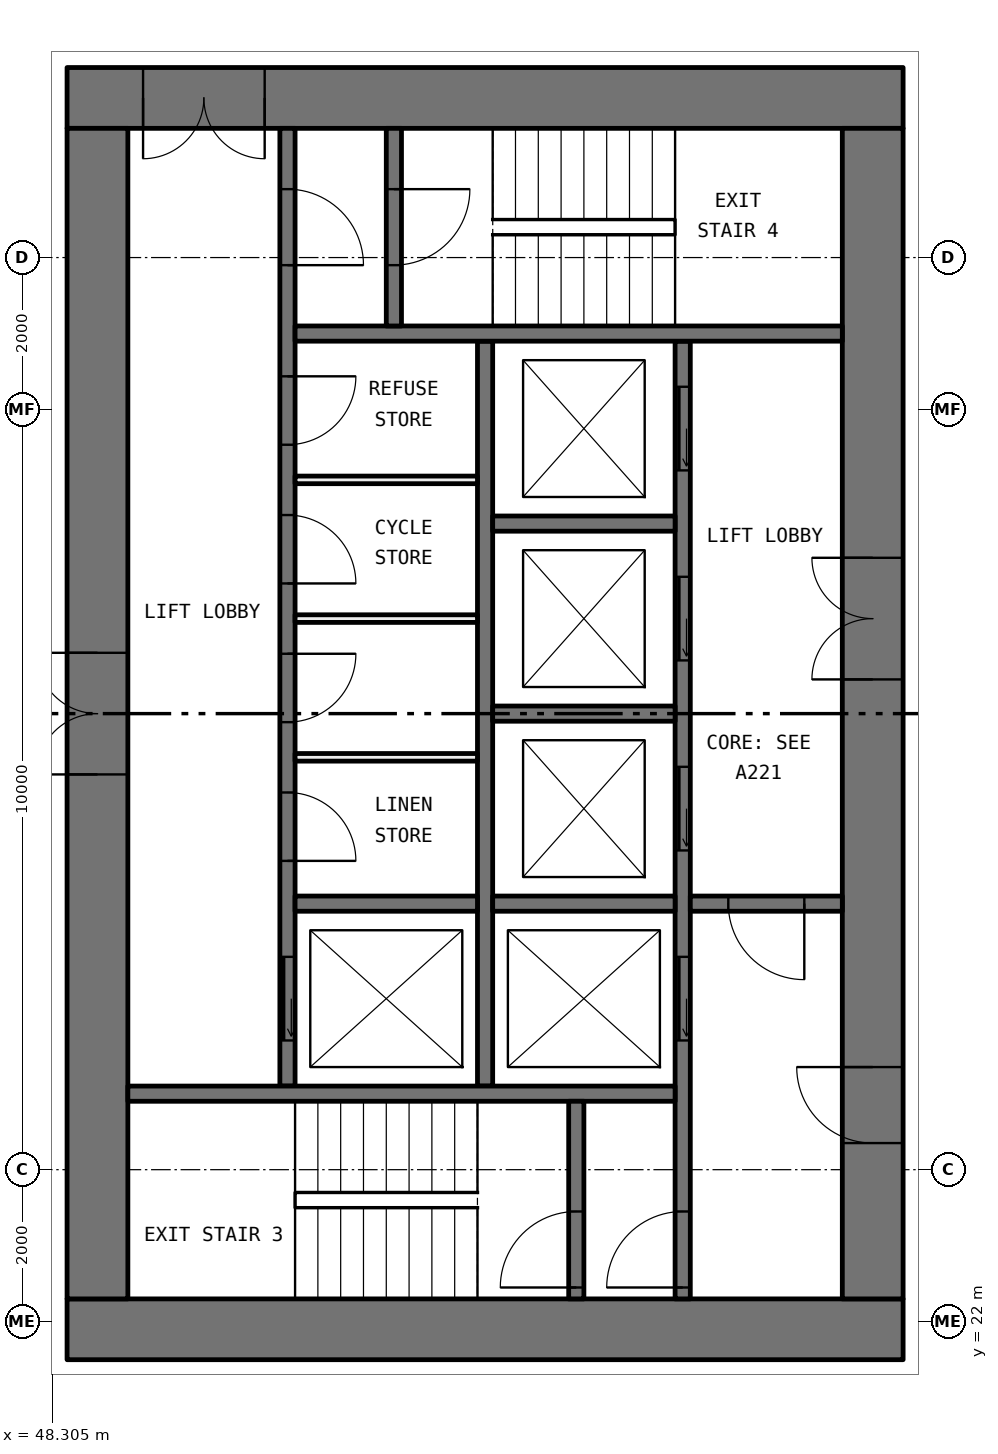
"""IFC4 building model, lengths in metres.
Left out: names, types, materials, properties, quantities, classifications, styles, units other than length and angle.
Written with IfcOpenShell. Run it as: python <this file> out.ifc"""

import sys

from ifc_helpers import new_model, si_unit, direction, frame, frame_2d, origin, place, context, subcontext, project, spatial, rectangle, extrude, element, fill, save


model = new_model("IFC4")
c1 = context("Model", 3, precision=1e-05, world=origin(), true_north=direction((0.0, 1.0)))
c2 = subcontext(c1, "Body", "Model", "MODEL_VIEW")
j1 = project(units=[si_unit("LENGTHUNIT", "METRE"), si_unit("PLANEANGLEUNIT", "RADIAN")], contexts=[c1])
p1 = place(None, origin())
s1 = spatial("IfcSite", under=j1, at=p1, CompositionType="ELEMENT")
p2 = place(p1, origin())
s2 = spatial("IfcBuilding", under=s1, at=p2, CompositionType="ELEMENT")
p3 = place(p2, frame((0.0, 0.0, 81.75)))
s3 = spatial("IfcBuildingStorey", under=s2, at=p3, CompositionType="ELEMENT", Elevation=81.75)
p4 = place(p3, frame((59.5, 21.9, 0.0), z_axis=(0.0, 0.0, 1.0), x_axis=(-1.0, 0.0, 0.0)))
e1 = element("IfcWall", 1, at=p4, inside=s3, PredefinedType="SHEAR", context=c2, shape_type="SweptSolid", body=[
    extrude(rectangle(XDim=11.0, YDim=0.8, at=frame_2d((5.5, 0.0))), origin(), (0.0, 0.0, 1.0), 3.05),
])
p5 = place(p3, frame((59.5, 38.1, 0.0), z_axis=(0.0, 0.0, 1.0), x_axis=(-1.0, 0.0, 0.0)))
e2 = element("IfcWall", 2, at=p5, inside=s3, PredefinedType="SHEAR", context=c2, shape_type="SweptSolid", body=[
    extrude(rectangle(XDim=11.0, YDim=0.8, at=frame_2d((5.5, 0.0))), origin(), (0.0, 0.0, 1.0), 3.05),
])
p6 = place(p5, frame((8.4, 0.0, 0.0)))
e3 = element("IfcOpeningElement", 3, at=p6, cuts=e2, PredefinedType="OPENING", context=c2, shape_type="SweptSolid", body=[
    extrude(rectangle(XDim=1.6, YDim=2.1, at=frame_2d((0.8, 1.05))), frame((0.0, 0.41, 0.0), z_axis=(0.0, -1.0, 0.0), x_axis=(1.0, 0.0, 0.0)), (0.0, 0.0, 1.0), 0.82),
])
p7 = place(p3, frame((59.1, 22.3, 0.0), z_axis=(0.0, 0.0, 1.0), x_axis=(0.0, 1.0, 0.0)))
e4 = element("IfcWall", 4, at=p7, inside=s3, PredefinedType="SHEAR", context=c2, shape_type="SweptSolid", body=[
    extrude(rectangle(XDim=15.4, YDim=0.8, at=frame_2d((7.7, 0.0))), origin(), (0.0, 0.0, 1.0), 3.05),
])
p8 = place(p7, frame((8.15, 0.0, 0.0)))
e5 = element("IfcOpeningElement", 5, at=p8, cuts=e4, PredefinedType="OPENING", context=c2, shape_type="SweptSolid", body=[
    extrude(rectangle(XDim=1.6, YDim=2.1, at=frame_2d((0.8, 1.05))), frame((0.0, 0.41, 0.0), z_axis=(0.0, -1.0, 0.0), x_axis=(1.0, 0.0, 0.0)), (0.0, 0.0, 1.0), 0.82),
])
p9 = place(p7, frame((2.05, 0.0, 0.0)))
e6 = element("IfcOpeningElement", 6, at=p9, cuts=e4, PredefinedType="OPENING", context=c2, shape_type="SweptSolid", body=[
    extrude(rectangle(XDim=1.0, YDim=2.1, at=frame_2d((0.5, 1.05))), frame((0.0, 0.41, 0.0), z_axis=(0.0, -1.0, 0.0), x_axis=(1.0, 0.0, 0.0)), (0.0, 0.0, 1.0), 0.82),
])
p10 = place(p3, frame((48.9, 22.3, 0.0), z_axis=(0.0, 0.0, 1.0), x_axis=(0.0, 1.0, 0.0)))
e7 = element("IfcWall", 7, at=p10, inside=s3, PredefinedType="SHEAR", context=c2, shape_type="SweptSolid", body=[
    extrude(rectangle(XDim=15.4, YDim=0.8, at=frame_2d((7.7, 0.0))), origin(), (0.0, 0.0, 1.0), 3.05),
])
p11 = place(p10, frame((6.9, 0.0, 0.0)))
e8 = element("IfcOpeningElement", 8, at=p11, cuts=e7, PredefinedType="OPENING", context=c2, shape_type="SweptSolid", body=[
    extrude(rectangle(XDim=1.6, YDim=2.1, at=frame_2d((0.8, 1.05))), frame((0.0, 0.41, 0.0), z_axis=(0.0, -1.0, 0.0), x_axis=(1.0, 0.0, 0.0)), (0.0, 0.0, 1.0), 0.82),
])
p12 = place(p3, frame((56.6, 22.3, 0.0), z_axis=(0.0, 0.0, 1.0), x_axis=(0.0, 1.0, 0.0)))
e9 = element("IfcWall", 9, at=p12, inside=s3, PredefinedType="SOLIDWALL", context=c2, shape_type="SweptSolid", body=[
    extrude(rectangle(XDim=12.6, YDim=0.2, at=frame_2d((6.3, 0.0))), origin(), (0.0, 0.0, 1.0), 3.05),
])
p13 = place(p12, frame((3.4, 0.0, 0.0)))
e10 = element("IfcOpeningElement", 10, at=p13, cuts=e9, PredefinedType="OPENING", context=c2, shape_type="SweptSolid", body=[
    extrude(rectangle(XDim=1.1, YDim=2.1, at=frame_2d((0.55, 1.05))), frame((0.0, 0.11, 0.0), z_axis=(0.0, -1.0, 0.0), x_axis=(1.0, 0.0, 0.0)), (0.0, 0.0, 1.0), 0.22),
])
p14 = place(p12, frame((5.9, 0.0, 0.0)))
e11 = element("IfcOpeningElement", 11, at=p14, cuts=e9, PredefinedType="OPENING", context=c2, shape_type="SweptSolid", body=[
    extrude(rectangle(XDim=1.1, YDim=2.1, at=frame_2d((0.55, 1.05))), frame((0.0, 0.11, 0.0), z_axis=(0.0, -1.0, 0.0), x_axis=(1.0, 0.0, 0.0)), (0.0, 0.0, 1.0), 0.22),
])
p15 = place(p12, frame((8.4, 0.0, 0.0)))
e12 = element("IfcOpeningElement", 12, at=p15, cuts=e9, PredefinedType="OPENING", context=c2, shape_type="SweptSolid", body=[
    extrude(rectangle(XDim=1.1, YDim=2.1, at=frame_2d((0.55, 1.05))), frame((0.0, 0.11, 0.0), z_axis=(0.0, -1.0, 0.0), x_axis=(1.0, 0.0, 0.0)), (0.0, 0.0, 1.0), 0.22),
])
p16 = place(p12, frame((10.9, 0.0, 0.0)))
e13 = element("IfcOpeningElement", 13, at=p16, cuts=e9, PredefinedType="OPENING", context=c2, shape_type="SweptSolid", body=[
    extrude(rectangle(XDim=1.1, YDim=2.1, at=frame_2d((0.55, 1.05))), frame((0.0, 0.11, 0.0), z_axis=(0.0, -1.0, 0.0), x_axis=(1.0, 0.0, 0.0)), (0.0, 0.0, 1.0), 0.22),
])
p17 = place(p12, frame((0.15, 0.0, 0.0)))
e14 = element("IfcOpeningElement", 14, at=p17, cuts=e9, PredefinedType="OPENING", context=c2, shape_type="SweptSolid", body=[
    extrude(rectangle(XDim=1.0, YDim=2.1, at=frame_2d((0.5, 1.05))), frame((0.0, 0.11, 0.0), z_axis=(0.0, -1.0, 0.0), x_axis=(1.0, 0.0, 0.0)), (0.0, 0.0, 1.0), 0.22),
])
p18 = place(p3, frame((51.4, 25.1, 0.0), z_axis=(0.0, 0.0, 1.0), x_axis=(0.0, 1.0, 0.0)))
e15 = element("IfcWall", 15, at=p18, inside=s3, PredefinedType="SOLIDWALL", context=c2, shape_type="SweptSolid", body=[
    extrude(rectangle(XDim=12.6, YDim=0.2, at=frame_2d((6.3, 0.0))), origin(), (0.0, 0.0, 1.0), 3.05),
])
p19 = place(p18, frame((0.6, 0.0, 0.0)))
e16 = element("IfcOpeningElement", 16, at=p19, cuts=e15, PredefinedType="OPENING", context=c2, shape_type="SweptSolid", body=[
    extrude(rectangle(XDim=1.1, YDim=2.1, at=frame_2d((0.55, 1.05))), frame((0.0, 0.11, 0.0), z_axis=(0.0, -1.0, 0.0), x_axis=(1.0, 0.0, 0.0)), (0.0, 0.0, 1.0), 0.22),
])
p20 = place(p18, frame((10.8, 0.0, 0.0)))
e17 = element("IfcOpeningElement", 17, at=p20, cuts=e15, PredefinedType="OPENING", context=c2, shape_type="SweptSolid", body=[
    extrude(rectangle(XDim=1.0, YDim=2.1, at=frame_2d((0.5, 1.05))), frame((0.0, 0.11, 0.0), z_axis=(0.0, -1.0, 0.0), x_axis=(1.0, 0.0, 0.0)), (0.0, 0.0, 1.0), 0.22),
])
p21 = place(p18, frame((2.962, 0.0, 0.0)))
e18 = element("IfcOpeningElement", 18, at=p21, cuts=e15, PredefinedType="OPENING", context=c2, shape_type="SweptSolid", body=[
    extrude(rectangle(XDim=0.9, YDim=2.1, at=frame_2d((0.45, 1.05))), frame((0.0, 0.11, 0.0), z_axis=(0.0, -1.0, 0.0), x_axis=(1.0, 0.0, 0.0)), (0.0, 0.0, 1.0), 0.22),
])
p22 = place(p18, frame((4.788, 0.0, 0.0)))
e19 = element("IfcOpeningElement", 19, at=p22, cuts=e15, PredefinedType="OPENING", context=c2, shape_type="SweptSolid", body=[
    extrude(rectangle(XDim=0.9, YDim=2.1, at=frame_2d((0.45, 1.05))), frame((0.0, 0.11, 0.0), z_axis=(0.0, -1.0, 0.0), x_axis=(1.0, 0.0, 0.0)), (0.0, 0.0, 1.0), 0.22),
])
p23 = place(p18, frame((6.613, 0.0, 0.0)))
e20 = element("IfcOpeningElement", 20, at=p23, cuts=e15, PredefinedType="OPENING", context=c2, shape_type="SweptSolid", body=[
    extrude(rectangle(XDim=0.9, YDim=2.1, at=frame_2d((0.45, 1.05))), frame((0.0, 0.11, 0.0), z_axis=(0.0, -1.0, 0.0), x_axis=(1.0, 0.0, 0.0)), (0.0, 0.0, 1.0), 0.22),
])
p24 = place(p18, frame((8.438, 0.0, 0.0)))
e21 = element("IfcOpeningElement", 21, at=p24, cuts=e15, PredefinedType="OPENING", context=c2, shape_type="SweptSolid", body=[
    extrude(rectangle(XDim=0.9, YDim=2.1, at=frame_2d((0.45, 1.05))), frame((0.0, 0.11, 0.0), z_axis=(0.0, -1.0, 0.0), x_axis=(1.0, 0.0, 0.0)), (0.0, 0.0, 1.0), 0.22),
])
p25 = place(p3, frame((54.0, 25.1, 0.0), z_axis=(0.0, 0.0, 1.0), x_axis=(0.0, 1.0, 0.0)))
e22 = element("IfcWall", 22, at=p25, inside=s3, PredefinedType="SOLIDWALL", context=c2, shape_type="SweptSolid", body=[
    extrude(rectangle(XDim=9.8, YDim=0.2, at=frame_2d((4.9, 0.0))), origin(), (0.0, 0.0, 1.0), 3.05),
])
for number, where, z_axis, x_axis in (
    (23, (56.5, 25.0, 0.0), (0.0, 0.0, 1.0), (-1.0, 0.0, 0.0)),
    (24, (58.7, 35.0, 0.0), (0.0, 0.0, 1.0), (-1.0, 0.0, 0.0)),
):
    element("IfcWall", number, at=place(p3, frame(where, z_axis=z_axis, x_axis=x_axis)), inside=s3, PredefinedType="SOLIDWALL", context=c2, shape_type="SweptSolid", body=[
        extrude(rectangle(XDim=7.2, YDim=0.2, at=frame_2d((3.6, 0.0))), origin(), (0.0, 0.0, 1.0), 3.05),
    ])
p26 = place(p3, frame((58.7, 27.5, 0.0), z_axis=(0.0, 0.0, 1.0), x_axis=(-1.0, 0.0, 0.0)))
e25 = element("IfcWall", 25, at=p26, inside=s3, PredefinedType="SOLIDWALL", context=c2, shape_type="SweptSolid", body=[
    extrude(rectangle(XDim=2.0, YDim=0.2, at=frame_2d((1.0, 0.0))), origin(), (0.0, 0.0, 1.0), 3.05),
])
p27 = place(p26, frame((0.5, 0.0, 0.0)))
e26 = element("IfcOpeningElement", 26, at=p27, cuts=e25, PredefinedType="OPENING", context=c2, shape_type="SweptSolid", body=[
    extrude(rectangle(XDim=1.0, YDim=2.1, at=frame_2d((0.5, 1.05))), frame((0.0, 0.11, 0.0), z_axis=(0.0, -1.0, 0.0), x_axis=(1.0, 0.0, 0.0)), (0.0, 0.0, 1.0), 0.22),
])
p28 = place(p3, frame((55.2, 22.3, 0.0), z_axis=(0.0, 0.0, 1.0), x_axis=(0.0, 1.0, 0.0)))
e27 = element("IfcWall", 27, at=p28, inside=s3, PredefinedType="SOLIDWALL", context=c2, shape_type="SweptSolid", body=[
    extrude(rectangle(XDim=2.6, YDim=0.2, at=frame_2d((1.3, 0.0))), origin(), (0.0, 0.0, 1.0), 3.05),
])
p29 = place(p28, frame((0.15, 0.0, 0.0)))
e28 = element("IfcOpeningElement", 28, at=p29, cuts=e27, PredefinedType="OPENING", context=c2, shape_type="SweptSolid", body=[
    extrude(rectangle(XDim=1.0, YDim=2.1, at=frame_2d((0.5, 1.05))), frame((0.0, 0.11, 0.0), z_axis=(0.0, -1.0, 0.0), x_axis=(1.0, 0.0, 0.0)), (0.0, 0.0, 1.0), 0.22),
])
p30 = place(p3, frame((52.8, 35.1, 0.0), z_axis=(0.0, 0.0, 1.0), x_axis=(0.0, 1.0, 0.0)))
e29 = element("IfcWall", 29, at=p30, inside=s3, PredefinedType="SOLIDWALL", context=c2, shape_type="SweptSolid", body=[
    extrude(rectangle(XDim=2.6, YDim=0.2, at=frame_2d((1.3, 0.0))), origin(), (0.0, 0.0, 1.0), 3.05),
])
p31 = place(p30, frame((0.8, 0.0, 0.0)))
e30 = element("IfcOpeningElement", 30, at=p31, cuts=e29, PredefinedType="OPENING", context=c2, shape_type="SweptSolid", body=[
    extrude(rectangle(XDim=1.0, YDim=2.1, at=frame_2d((0.5, 1.05))), frame((0.0, 0.11, 0.0), z_axis=(0.0, -1.0, 0.0), x_axis=(1.0, 0.0, 0.0)), (0.0, 0.0, 1.0), 0.22),
])
for number, where, z_axis, x_axis in (
    (31, (56.5, 27.5, 0.0), (0.0, 0.0, 1.0), (-1.0, 0.0, 0.0)),
    (32, (56.5, 30.0, 0.0), (0.0, 0.0, 1.0), (-1.0, 0.0, 0.0)),
    (33, (56.5, 32.5, 0.0), (0.0, 0.0, 1.0), (-1.0, 0.0, 0.0)),
    (34, (53.9, 27.5, 0.0), (0.0, 0.0, 1.0), (-1.0, 0.0, 0.0)),
):
    element("IfcWall", number, at=place(p3, frame(where, z_axis=z_axis, x_axis=x_axis)), inside=s3, PredefinedType="SOLIDWALL", context=c2, shape_type="SweptSolid", body=[
        extrude(rectangle(XDim=2.4, YDim=0.2, at=frame_2d((1.2, 0.0))), origin(), (0.0, 0.0, 1.0), 3.05),
    ])
for number, where, z_axis, x_axis in (
    (35, (53.9, 29.425, 0.0), (0.0, 0.0, 1.0), (-1.0, 0.0, 0.0)),
    (36, (53.9, 31.25, 0.0), (0.0, 0.0, 1.0), (-1.0, 0.0, 0.0)),
    (37, (53.9, 33.075, 0.0), (0.0, 0.0, 1.0), (-1.0, 0.0, 0.0)),
):
    element("IfcWall", number, at=place(p3, frame(where, z_axis=z_axis, x_axis=x_axis)), inside=s3, PredefinedType="PARTITIONING", context=c2, shape_type="SweptSolid", body=[
        extrude(rectangle(XDim=2.4, YDim=0.1, at=frame_2d((1.2, 0.0))), origin(), (0.0, 0.0, 1.0), 3.05),
    ])
p32 = place(p19, origin())
e38 = element("IfcDoor", 38, at=p32, inside=s3, OperationType="SLIDING_TO_LEFT", PredefinedType="DOOR", context=c2, shape_type="SweptSolid", body=[
    extrude(rectangle(XDim=1.1, YDim=2.1, at=frame_2d((0.55, 1.05))), frame((0.0, 0.025, 0.0), z_axis=(0.0, -1.0, 0.0), x_axis=(1.0, 0.0, 0.0)), (0.0, 0.0, 1.0), 0.05),
])
fill(e16, e38)
p33 = place(p13, origin())
e39 = element("IfcDoor", 39, at=p33, inside=s3, OperationType="SLIDING_TO_LEFT", PredefinedType="DOOR", context=c2, shape_type="SweptSolid", body=[
    extrude(rectangle(XDim=1.1, YDim=2.1, at=frame_2d((0.55, 1.05))), frame((0.0, 0.025, 0.0), z_axis=(0.0, -1.0, 0.0), x_axis=(1.0, 0.0, 0.0)), (0.0, 0.0, 1.0), 0.05),
])
fill(e10, e39)
p34 = place(p14, origin())
e40 = element("IfcDoor", 40, at=p34, inside=s3, OperationType="SLIDING_TO_LEFT", PredefinedType="DOOR", context=c2, shape_type="SweptSolid", body=[
    extrude(rectangle(XDim=1.1, YDim=2.1, at=frame_2d((0.55, 1.05))), frame((0.0, 0.025, 0.0), z_axis=(0.0, -1.0, 0.0), x_axis=(1.0, 0.0, 0.0)), (0.0, 0.0, 1.0), 0.05),
])
fill(e11, e40)
p35 = place(p15, origin())
e41 = element("IfcDoor", 41, at=p35, inside=s3, OperationType="SLIDING_TO_LEFT", PredefinedType="DOOR", context=c2, shape_type="SweptSolid", body=[
    extrude(rectangle(XDim=1.1, YDim=2.1, at=frame_2d((0.55, 1.05))), frame((0.0, 0.025, 0.0), z_axis=(0.0, -1.0, 0.0), x_axis=(1.0, 0.0, 0.0)), (0.0, 0.0, 1.0), 0.05),
])
fill(e12, e41)
p36 = place(p16, origin())
e42 = element("IfcDoor", 42, at=p36, inside=s3, OperationType="SLIDING_TO_LEFT", PredefinedType="DOOR", context=c2, shape_type="SweptSolid", body=[
    extrude(rectangle(XDim=1.1, YDim=2.1, at=frame_2d((0.55, 1.05))), frame((0.0, 0.025, 0.0), z_axis=(0.0, -1.0, 0.0), x_axis=(1.0, 0.0, 0.0)), (0.0, 0.0, 1.0), 0.05),
])
fill(e13, e42)
p37 = place(p29, origin())
e43 = element("IfcDoor", 43, at=p37, inside=s3, OperationType="SINGLE_SWING_RIGHT", PredefinedType="DOOR", context=c2, shape_type="SweptSolid", body=[
    extrude(rectangle(XDim=1.0, YDim=2.1, at=frame_2d((0.5, 1.05))), frame((0.0, 0.025, 0.0), z_axis=(0.0, -1.0, 0.0), x_axis=(1.0, 0.0, 0.0)), (0.0, 0.0, 1.0), 0.05),
])
fill(e28, e43)
p38 = place(p17, origin())
e44 = element("IfcDoor", 44, at=p38, inside=s3, OperationType="SINGLE_SWING_RIGHT", PredefinedType="DOOR", context=c2, shape_type="SweptSolid", body=[
    extrude(rectangle(XDim=1.0, YDim=2.1, at=frame_2d((0.5, 1.05))), frame((0.0, 0.025, 0.0), z_axis=(0.0, -1.0, 0.0), x_axis=(1.0, 0.0, 0.0)), (0.0, 0.0, 1.0), 0.05),
])
fill(e14, e44)
p39 = place(p20, frame((1.0, 0.0, 0.0), x_axis=(-1.0, 0.0, 0.0)))
e45 = element("IfcDoor", 45, at=p39, inside=s3, OperationType="SINGLE_SWING_LEFT", PredefinedType="DOOR", context=c2, shape_type="SweptSolid", body=[
    extrude(rectangle(XDim=1.0, YDim=2.1, at=frame_2d((0.5, 1.05))), frame((0.0, 0.025, 0.0), z_axis=(0.0, -1.0, 0.0), x_axis=(1.0, 0.0, 0.0)), (0.0, 0.0, 1.0), 0.05),
])
fill(e17, e45)
p40 = place(p31, frame((1.0, 0.0, 0.0), x_axis=(-1.0, 0.0, 0.0)))
e46 = element("IfcDoor", 46, at=p40, inside=s3, OperationType="SINGLE_SWING_RIGHT", PredefinedType="DOOR", context=c2, shape_type="SweptSolid", body=[
    extrude(rectangle(XDim=1.0, YDim=2.1, at=frame_2d((0.5, 1.05))), frame((0.0, 0.025, 0.0), z_axis=(0.0, -1.0, 0.0), x_axis=(1.0, 0.0, 0.0)), (0.0, 0.0, 1.0), 0.05),
])
fill(e30, e46)
p41 = place(p27, origin())
e47 = element("IfcDoor", 47, at=p41, inside=s3, OperationType="SINGLE_SWING_RIGHT", PredefinedType="DOOR", context=c2, shape_type="SweptSolid", body=[
    extrude(rectangle(XDim=1.0, YDim=2.1, at=frame_2d((0.5, 1.05))), frame((0.0, 0.025, 0.0), z_axis=(0.0, -1.0, 0.0), x_axis=(1.0, 0.0, 0.0)), (0.0, 0.0, 1.0), 0.05),
])
fill(e26, e47)
p42 = place(p8, origin())
e48 = element("IfcDoor", 48, at=p42, inside=s3, OperationType="DOUBLE_DOOR_SINGLE_SWING", PredefinedType="DOOR", context=c2, shape_type="SweptSolid", body=[
    extrude(rectangle(XDim=1.6, YDim=2.1, at=frame_2d((0.8, 1.05))), frame((0.0, 0.025, 0.0), z_axis=(0.0, -1.0, 0.0), x_axis=(1.0, 0.0, 0.0)), (0.0, 0.0, 1.0), 0.05),
])
fill(e5, e48)
p43 = place(p9, origin())
e49 = element("IfcDoor", 49, at=p43, inside=s3, OperationType="SINGLE_SWING_LEFT", PredefinedType="DOOR", context=c2, shape_type="SweptSolid", body=[
    extrude(rectangle(XDim=1.0, YDim=2.1, at=frame_2d((0.5, 1.05))), frame((0.0, 0.025, 0.0), z_axis=(0.0, -1.0, 0.0), x_axis=(1.0, 0.0, 0.0)), (0.0, 0.0, 1.0), 0.05),
])
fill(e6, e49)
p44 = place(p6, origin())
e50 = element("IfcDoor", 50, at=p44, inside=s3, OperationType="DOUBLE_DOOR_SINGLE_SWING", PredefinedType="DOOR", context=c2, shape_type="SweptSolid", body=[
    extrude(rectangle(XDim=1.6, YDim=2.1, at=frame_2d((0.8, 1.05))), frame((0.0, 0.025, 0.0), z_axis=(0.0, -1.0, 0.0), x_axis=(1.0, 0.0, 0.0)), (0.0, 0.0, 1.0), 0.05),
])
fill(e3, e50)
p45 = place(p11, origin())
e51 = element("IfcDoor", 51, at=p45, inside=s3, OperationType="DOUBLE_DOOR_SINGLE_SWING", PredefinedType="DOOR", context=c2, shape_type="SweptSolid", body=[
    extrude(rectangle(XDim=1.6, YDim=2.1, at=frame_2d((0.8, 1.05))), frame((0.0, 0.025, 0.0), z_axis=(0.0, -1.0, 0.0), x_axis=(1.0, 0.0, 0.0)), (0.0, 0.0, 1.0), 0.05),
])
fill(e8, e51)
p46 = place(p21, frame((0.9, 0.0, 0.0), x_axis=(-1.0, 0.0, 0.0)))
e52 = element("IfcDoor", 52, at=p46, inside=s3, OperationType="SINGLE_SWING_LEFT", PredefinedType="DOOR", context=c2, shape_type="SweptSolid", body=[
    extrude(rectangle(XDim=0.9, YDim=2.1, at=frame_2d((0.45, 1.05))), frame((0.0, 0.025, 0.0), z_axis=(0.0, -1.0, 0.0), x_axis=(1.0, 0.0, 0.0)), (0.0, 0.0, 1.0), 0.05),
])
fill(e18, e52)
p47 = place(p22, frame((0.9, 0.0, 0.0), x_axis=(-1.0, 0.0, 0.0)))
e53 = element("IfcDoor", 53, at=p47, inside=s3, OperationType="SINGLE_SWING_RIGHT", PredefinedType="DOOR", context=c2, shape_type="SweptSolid", body=[
    extrude(rectangle(XDim=0.9, YDim=2.1, at=frame_2d((0.45, 1.05))), frame((0.0, 0.025, 0.0), z_axis=(0.0, -1.0, 0.0), x_axis=(1.0, 0.0, 0.0)), (0.0, 0.0, 1.0), 0.05),
])
fill(e19, e53)
p48 = place(p23, frame((0.9, 0.0, 0.0), x_axis=(-1.0, 0.0, 0.0)))
e54 = element("IfcDoor", 54, at=p48, inside=s3, OperationType="SINGLE_SWING_LEFT", PredefinedType="DOOR", context=c2, shape_type="SweptSolid", body=[
    extrude(rectangle(XDim=0.9, YDim=2.1, at=frame_2d((0.45, 1.05))), frame((0.0, 0.025, 0.0), z_axis=(0.0, -1.0, 0.0), x_axis=(1.0, 0.0, 0.0)), (0.0, 0.0, 1.0), 0.05),
])
fill(e20, e54)
p49 = place(p24, frame((0.9, 0.0, 0.0), x_axis=(-1.0, 0.0, 0.0)))
e55 = element("IfcDoor", 55, at=p49, inside=s3, OperationType="SINGLE_SWING_RIGHT", PredefinedType="DOOR", context=c2, shape_type="SweptSolid", body=[
    extrude(rectangle(XDim=0.9, YDim=2.1, at=frame_2d((0.45, 1.05))), frame((0.0, 0.025, 0.0), z_axis=(0.0, -1.0, 0.0), x_axis=(1.0, 0.0, 0.0)), (0.0, 0.0, 1.0), 0.05),
])
fill(e21, e55)
save(model, sys.argv[1])
